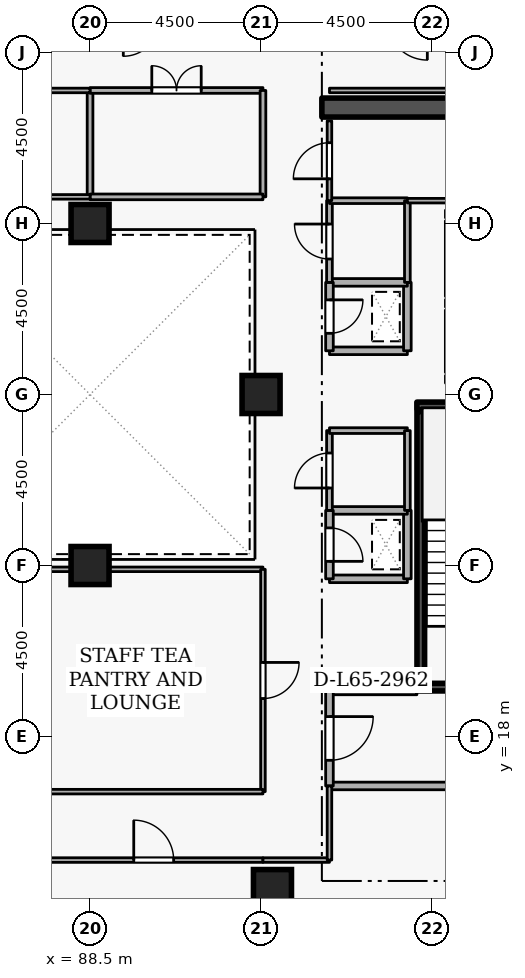
"""IFC4 building model, lengths in metres.
Left out: names, types, materials, properties, quantities, classifications, styles, units other than length and angle.
Written with IfcOpenShell. Run it as: python <this file> out.ifc"""

import sys

from ifc_helpers import new_model, si_unit, direction, frame, frame_2d, origin, origin_2d, place, context, subcontext, project, spatial, rectangle, extrude, element, fill, save


model = new_model("IFC4")
c1 = context("Model", 3, precision=1e-05, world=origin(), true_north=direction((0.0, 1.0)))
c2 = subcontext(c1, "Body", "Model", "MODEL_VIEW")
j1 = project(units=[si_unit("LENGTHUNIT", "METRE"), si_unit("PLANEANGLEUNIT", "RADIAN")], contexts=[c1])
p1 = place(None, origin())
s1 = spatial("IfcSite", under=j1, at=p1, CompositionType="ELEMENT")
p2 = place(p1, origin())
s2 = spatial("IfcBuilding", under=s1, at=p2, CompositionType="ELEMENT")
p3 = place(p2, frame((0.0, 0.0, 243.9)))
s3 = spatial("IfcBuildingStorey", under=s2, at=p3, CompositionType="ELEMENT", Elevation=243.9)
p4 = place(p3, frame((94.6, 34.55, 0.0), z_axis=(0.0, 0.0, 1.0), x_axis=(1.0, 0.0, 0.0)))
e1 = element("IfcWall", 1, at=p4, inside=s3, PredefinedType="SHEAR", context=c2, shape_type="SweptSolid", body=[
    extrude(rectangle(XDim=5.8, YDim=0.5, at=frame_2d((2.9, 0.0))), origin(), (0.0, 0.0, 1.0), 3.6),
])
for number, where, z_axis, x_axis in (
    (2, (93.3, 14.0, 0.0), (0.0, 0.0, 1.0), (1.0, 0.0, 0.0)),
    (3, (93.0, 27.0, 0.0), (0.0, 0.0, 1.0), (1.0, 0.0, 0.0)),
    (4, (88.5, 22.5, 0.0), (0.0, 0.0, 1.0), (1.0, 0.0, 0.0)),
    (5, (88.5, 31.5, 0.0), (0.0, 0.0, 1.0), (1.0, 0.0, 0.0)),
):
    element("IfcColumn", number, at=place(p3, frame(where, z_axis=z_axis, x_axis=x_axis)), inside=s3, PredefinedType="COLUMN", context=c2, shape_type="SweptSolid", body=[
        extrude(rectangle(XDim=1.0, YDim=1.0, at=origin_2d()), origin(), (0.0, 0.0, 1.0), 3.6),
    ])
p5 = place(p3, frame((97.95, 29.22, 0.0), z_axis=(0.0, 0.0, 1.0), x_axis=(0.0, -1.0, 0.0)))
e6 = element("IfcWall", 6, at=p5, inside=s3, PredefinedType="STANDARD", context=c2, shape_type="SweptSolid", body=[
    extrude(rectangle(XDim=1.64, YDim=0.2, at=frame_2d((0.82, 0.0))), origin(), (0.0, 0.0, 1.0), 3.34),
])
p6 = place(p5, frame((0.31, 0.0, 0.0)))
e7 = element("IfcOpeningElement", 7, at=p6, cuts=e6, PredefinedType="OPENING", context=c2, shape_type="SweptSolid", body=[
    extrude(rectangle(XDim=1.02, YDim=2.06, at=frame_2d((0.51, 1.03))), frame((0.0, 0.11, 0.0), z_axis=(0.0, -1.0, 0.0), x_axis=(1.0, 0.0, 0.0)), (0.0, 0.0, 1.0), 0.22),
])
p7 = place(p3, frame((97.95, 31.57, 0.0), z_axis=(0.0, 0.0, 1.0), x_axis=(0.0, -1.0, 0.0)))
e8 = element("IfcWall", 8, at=p7, inside=s3, PredefinedType="STANDARD", context=c2, shape_type="SweptSolid", body=[
    extrude(rectangle(XDim=1.99, YDim=0.2, at=frame_2d((0.995, 0.0))), origin(), (0.0, 0.0, 1.0), 3.34),
])
p8 = place(p7, frame((0.485, 0.0, 0.0)))
e9 = element("IfcOpeningElement", 9, at=p8, cuts=e8, PredefinedType="OPENING", context=c2, shape_type="SweptSolid", body=[
    extrude(rectangle(XDim=1.02, YDim=2.06, at=frame_2d((0.51, 1.03))), frame((0.0, 0.11, 0.0), z_axis=(0.0, -1.0, 0.0), x_axis=(1.0, 0.0, 0.0)), (0.0, 0.0, 1.0), 0.22),
])
p9 = place(p3, frame((100.45, 19.3, 0.0), z_axis=(0.0, 0.0, 1.0), x_axis=(-1.0, 0.0, 0.0)))
e10 = element("IfcWall", 10, at=p9, inside=s3, PredefinedType="SHEAR", context=c2, shape_type="SweptSolid", body=[
    extrude(rectangle(XDim=3.35, YDim=0.2, at=frame_2d((1.675, 0.0))), origin(), (0.0, 0.0, 1.0), 3.6),
])
p10 = place(p9, frame((1.125, 0.0, 0.0)))
e11 = element("IfcOpeningElement", 11, at=p10, cuts=e10, PredefinedType="OPENING", context=c2, shape_type="SweptSolid", body=[
    extrude(rectangle(XDim=1.1, YDim=2.1, at=frame_2d((0.55, 1.05))), frame((0.0, 0.11, 0.0), z_axis=(0.0, -1.0, 0.0), x_axis=(1.0, 0.0, 0.0)), (0.0, 0.0, 1.0), 0.22),
])
p11 = place(p3, frame((97.1, 26.7, 0.0), z_axis=(0.0, 0.0, 1.0), x_axis=(1.0, 0.0, 0.0)))
e12 = element("IfcWall", 12, at=p11, inside=s3, PredefinedType="SHEAR", context=c2, shape_type="SweptSolid", body=[
    extrude(rectangle(XDim=3.35, YDim=0.2, at=frame_2d((1.675, 0.0))), origin(), (0.0, 0.0, 1.0), 3.6),
])
p12 = place(p3, frame((97.203, 26.55, 0.0), z_axis=(0.0, 0.0, 1.0), x_axis=(0.0, -1.0, 0.0)))
e13 = element("IfcWall", 13, at=p12, inside=s3, PredefinedType="SHEAR", context=c2, shape_type="SweptSolid", body=[
    extrude(rectangle(XDim=7.1, YDim=0.2, at=frame_2d((3.55, 0.0))), origin(), (0.0, 0.0, 1.0), 3.6),
])
p13 = place(p3, frame((94.8, 16.7, 0.0), z_axis=(0.0, 0.0, 1.0), x_axis=(1.0, 0.0, 0.0)))
e14 = element("IfcWall", 14, at=p13, inside=s3, PredefinedType="STANDARD", context=c2, shape_type="SweptSolid", body=[
    extrude(rectangle(XDim=5.7, YDim=0.2, at=frame_2d((2.85, 0.0))), origin(), (0.0, 0.0, 1.0), 3.34),
])
p14 = place(p3, frame((97.1, 19.2, 0.0), z_axis=(0.0, 0.0, 1.0), x_axis=(-1.0, 0.0, 0.0)))
e15 = element("IfcWall", 15, at=p14, inside=s3, PredefinedType="STANDARD", context=c2, shape_type="SweptSolid", body=[
    extrude(rectangle(XDim=2.3, YDim=0.2, at=frame_2d((1.15, 0.0))), origin(), (0.0, 0.0, 1.0), 2.545),
])
p15 = place(p3, frame((94.8, 19.2, 0.0), z_axis=(0.0, 0.0, 1.0), x_axis=(0.0, -1.0, 0.0)))
e16 = element("IfcWall", 16, at=p15, inside=s3, PredefinedType="STANDARD", context=c2, shape_type="SweptSolid", body=[
    extrude(rectangle(XDim=2.5, YDim=0.2, at=frame_2d((1.25, 0.0))), origin(), (0.0, 0.0, 1.0), 3.34),
])
p16 = place(p15, frame((0.675, 0.0, 0.0)))
e17 = element("IfcOpeningElement", 17, at=p16, cuts=e16, PredefinedType="OPENING", context=c2, shape_type="SweptSolid", body=[
    extrude(rectangle(XDim=1.15, YDim=2.1, at=frame_2d((0.575, 1.05))), frame((0.0, 0.11, 0.0), z_axis=(0.0, -1.0, 0.0), x_axis=(1.0, 0.0, 0.0)), (0.0, 0.0, 1.0), 0.22),
])
p17 = place(p3, frame((94.8, 28.15, 0.0), z_axis=(0.0, 0.0, 1.0), x_axis=(1.0, 0.0, 0.0)))
e18 = element("IfcWall", 18, at=p17, inside=s3, PredefinedType="STANDARD", context=c2, shape_type="SweptSolid", body=[
    extrude(rectangle(XDim=2.05, YDim=0.2, at=frame_2d((1.025, 0.0))), origin(), (0.0, 0.0, 1.0), 3.34),
])
p18 = place(p3, frame((96.85, 28.15, 0.0), z_axis=(0.0, 0.0, 1.0), x_axis=(0.0, 1.0, 0.0)))
e19 = element("IfcWall", 19, at=p18, inside=s3, PredefinedType="STANDARD", context=c2, shape_type="SweptSolid", body=[
    extrude(rectangle(XDim=1.8, YDim=0.2, at=frame_2d((0.9, 0.0))), origin(), (0.0, 0.0, 1.0), 3.34),
])
p19 = place(p3, frame((96.85, 29.95, 0.0), z_axis=(0.0, 0.0, 1.0), x_axis=(-1.0, 0.0, 0.0)))
e20 = element("IfcWall", 20, at=p19, inside=s3, PredefinedType="STANDARD", context=c2, shape_type="SweptSolid", body=[
    extrude(rectangle(XDim=2.05, YDim=0.2, at=frame_2d((1.025, 0.0))), origin(), (0.0, 0.0, 1.0), 3.34),
])
p20 = place(p3, frame((94.8, 29.95, 0.0), z_axis=(0.0, 0.0, 1.0), x_axis=(0.0, -1.0, 0.0)))
e21 = element("IfcWall", 21, at=p20, inside=s3, PredefinedType="STANDARD", context=c2, shape_type="SweptSolid", body=[
    extrude(rectangle(XDim=1.8, YDim=0.2, at=frame_2d((0.9, 0.0))), origin(), (0.0, 0.0, 1.0), 3.34),
])
p21 = place(p20, frame((0.46, 0.0, 0.0)))
e22 = element("IfcOpeningElement", 22, at=p21, cuts=e21, PredefinedType="OPENING", context=c2, shape_type="SweptSolid", body=[
    extrude(rectangle(XDim=0.88, YDim=2.04, at=frame_2d((0.44, 1.02))), frame((0.0, 0.11, 0.0), z_axis=(0.0, -1.0, 0.0), x_axis=(1.0, 0.0, 0.0)), (0.0, 0.0, 1.0), 0.22),
])
p22 = place(p3, frame((94.8, 22.15, 0.0), z_axis=(0.0, 0.0, 1.0), x_axis=(1.0, 0.0, 0.0)))
e23 = element("IfcWall", 23, at=p22, inside=s3, PredefinedType="STANDARD", context=c2, shape_type="SweptSolid", body=[
    extrude(rectangle(XDim=2.05, YDim=0.2, at=frame_2d((1.025, 0.0))), origin(), (0.0, 0.0, 1.0), 3.34),
])
p23 = place(p3, frame((96.85, 22.15, 0.0), z_axis=(0.0, 0.0, 1.0), x_axis=(0.0, 1.0, 0.0)))
e24 = element("IfcWall", 24, at=p23, inside=s3, PredefinedType="STANDARD", context=c2, shape_type="SweptSolid", body=[
    extrude(rectangle(XDim=1.8, YDim=0.2, at=frame_2d((0.9, 0.0))), origin(), (0.0, 0.0, 1.0), 3.34),
])
p24 = place(p3, frame((96.85, 23.95, 0.0), z_axis=(0.0, 0.0, 1.0), x_axis=(-1.0, 0.0, 0.0)))
e25 = element("IfcWall", 25, at=p24, inside=s3, PredefinedType="STANDARD", context=c2, shape_type="SweptSolid", body=[
    extrude(rectangle(XDim=2.05, YDim=0.2, at=frame_2d((1.025, 0.0))), origin(), (0.0, 0.0, 1.0), 3.34),
])
p25 = place(p3, frame((94.8, 23.95, 0.0), z_axis=(0.0, 0.0, 1.0), x_axis=(0.0, -1.0, 0.0)))
e26 = element("IfcWall", 26, at=p25, inside=s3, PredefinedType="STANDARD", context=c2, shape_type="SweptSolid", body=[
    extrude(rectangle(XDim=1.8, YDim=0.2, at=frame_2d((0.9, 0.0))), origin(), (0.0, 0.0, 1.0), 3.34),
])
p26 = place(p25, frame((0.46, 0.0, 0.0)))
e27 = element("IfcOpeningElement", 27, at=p26, cuts=e26, PredefinedType="OPENING", context=c2, shape_type="SweptSolid", body=[
    extrude(rectangle(XDim=0.88, YDim=2.04, at=frame_2d((0.44, 1.02))), frame((0.0, 0.11, 0.0), z_axis=(0.0, -1.0, 0.0), x_axis=(1.0, 0.0, 0.0)), (0.0, 0.0, 1.0), 0.22),
])
p27 = place(p3, frame((94.8, 23.95, 0.0), z_axis=(0.0, 0.0, 1.0), x_axis=(0.0, 1.0, 0.0)))
e28 = element("IfcWall", 28, at=p27, inside=s3, PredefinedType="PARTITIONING", context=c2, shape_type="SweptSolid", body=[
    extrude(rectangle(XDim=2.1, YDim=0.15, at=frame_2d((1.05, 0.0))), origin(), (0.0, 0.0, 1.0), 3.34),
])
p28 = place(p27, frame((0.59, 0.0, 0.0)))
e29 = element("IfcOpeningElement", 29, at=p28, cuts=e28, PredefinedType="OPENING", context=c2, shape_type="SweptSolid", body=[
    extrude(rectangle(XDim=0.92, YDim=2.08, at=frame_2d((0.46, 1.04))), frame((0.0, 0.085, 0.0), z_axis=(0.0, -1.0, 0.0), x_axis=(1.0, 0.0, 0.0)), (0.0, 0.0, 1.0), 0.17),
])
p29 = place(p3, frame((94.8, 26.05, 0.0), z_axis=(0.0, 0.0, 1.0), x_axis=(1.0, 0.0, 0.0)))
e30 = element("IfcWall", 30, at=p29, inside=s3, PredefinedType="PARTITIONING", context=c2, shape_type="SweptSolid", body=[
    extrude(rectangle(XDim=2.05, YDim=0.15, at=frame_2d((1.025, 0.0))), origin(), (0.0, 0.0, 1.0), 3.34),
])
p30 = place(p3, frame((96.85, 26.05, 0.0), z_axis=(0.0, 0.0, 1.0), x_axis=(0.0, -1.0, 0.0)))
e31 = element("IfcWall", 31, at=p30, inside=s3, PredefinedType="PARTITIONING", context=c2, shape_type="SweptSolid", body=[
    extrude(rectangle(XDim=2.1, YDim=0.15, at=frame_2d((1.05, 0.0))), origin(), (0.0, 0.0, 1.0), 3.34),
])
p31 = place(p3, frame((94.8, 29.95, 0.0), z_axis=(0.0, 0.0, 1.0), x_axis=(0.0, 1.0, 0.0)))
e32 = element("IfcWall", 32, at=p31, inside=s3, PredefinedType="PARTITIONING", context=c2, shape_type="SweptSolid", body=[
    extrude(rectangle(XDim=2.15, YDim=0.15, at=frame_2d((1.075, 0.0))), origin(), (0.0, 0.0, 1.0), 3.34),
])
p32 = place(p31, frame((0.615, 0.0, 0.0)))
e33 = element("IfcOpeningElement", 33, at=p32, cuts=e32, PredefinedType="OPENING", context=c2, shape_type="SweptSolid", body=[
    extrude(rectangle(XDim=0.92, YDim=2.08, at=frame_2d((0.46, 1.04))), frame((0.0, 0.085, 0.0), z_axis=(0.0, -1.0, 0.0), x_axis=(1.0, 0.0, 0.0)), (0.0, 0.0, 1.0), 0.17),
])
p33 = place(p3, frame((94.8, 32.1, 0.0), z_axis=(0.0, 0.0, 1.0), x_axis=(1.0, 0.0, 0.0)))
e34 = element("IfcWall", 34, at=p33, inside=s3, PredefinedType="PARTITIONING", context=c2, shape_type="SweptSolid", body=[
    extrude(rectangle(XDim=2.05, YDim=0.15, at=frame_2d((1.025, 0.0))), origin(), (0.0, 0.0, 1.0), 3.34),
])
p34 = place(p3, frame((96.85, 32.1, 0.0), z_axis=(0.0, 0.0, 1.0), x_axis=(0.0, -1.0, 0.0)))
e35 = element("IfcWall", 35, at=p34, inside=s3, PredefinedType="PARTITIONING", context=c2, shape_type="SweptSolid", body=[
    extrude(rectangle(XDim=2.15, YDim=0.15, at=frame_2d((1.075, 0.0))), origin(), (0.0, 0.0, 1.0), 3.34),
])
p35 = place(p3, frame((94.8, 32.1, 0.0), z_axis=(0.0, 0.0, 1.0), x_axis=(0.0, 1.0, 0.0)))
e36 = element("IfcWall", 36, at=p35, inside=s3, PredefinedType="PARTITIONING", context=c2, shape_type="SweptSolid", body=[
    extrude(rectangle(XDim=2.1, YDim=0.12, at=frame_2d((1.05, 0.0))), origin(), (0.0, 0.0, 1.0), 3.34),
])
p36 = place(p35, frame((0.575, 0.0, 0.0)))
e37 = element("IfcOpeningElement", 37, at=p36, cuts=e36, PredefinedType="OPENING", context=c2, shape_type="SweptSolid", body=[
    extrude(rectangle(XDim=0.95, YDim=2.1, at=frame_2d((0.475, 1.05))), frame((0.0, 0.07, 0.0), z_axis=(0.0, -1.0, 0.0), x_axis=(1.0, 0.0, 0.0)), (0.0, 0.0, 1.0), 0.14),
])
p37 = place(p3, frame((100.4, 32.1, 0.0), z_axis=(0.0, 0.0, 1.0), x_axis=(-1.0, 0.0, 0.0)))
e38 = element("IfcWall", 38, at=p37, inside=s3, PredefinedType="PARTITIONING", context=c2, shape_type="SweptSolid", body=[
    extrude(rectangle(XDim=3.55, YDim=0.12, at=frame_2d((1.775, 0.0))), origin(), (0.0, 0.0, 1.0), 3.34),
])
p38 = place(p3, frame((94.8, 35.0, 0.0), z_axis=(0.0, 0.0, 1.0), x_axis=(1.0, 0.0, 0.0)))
e39 = element("IfcWall", 39, at=p38, inside=s3, PredefinedType="PARTITIONING", context=c2, shape_type="SweptSolid", body=[
    extrude(rectangle(XDim=5.9, YDim=0.12, at=frame_2d((2.95, 0.0))), origin(), (0.0, 0.0, 1.0), 3.34),
])
p39 = place(p3, frame((87.3, 14.75, 0.0), z_axis=(0.0, 0.0, 1.0), x_axis=(1.0, 0.0, 0.0)))
e40 = element("IfcWall", 40, at=p39, inside=s3, PredefinedType="PARTITIONING", context=c2, shape_type="SweptSolid", body=[
    extrude(rectangle(XDim=5.75, YDim=0.12, at=frame_2d((2.875, 0.0))), origin(), (0.0, 0.0, 1.0), 3.34),
])
p40 = place(p39, frame((2.35, 0.0, 0.0)))
e41 = element("IfcOpeningElement", 41, at=p40, cuts=e40, PredefinedType="OPENING", context=c2, shape_type="SweptSolid", body=[
    extrude(rectangle(XDim=1.05, YDim=2.1, at=frame_2d((0.525, 1.05))), frame((0.0, 0.07, 0.0), z_axis=(0.0, -1.0, 0.0), x_axis=(1.0, 0.0, 0.0)), (0.0, 0.0, 1.0), 0.14),
])
p41 = place(p3, frame((93.05, 14.75, 0.0), z_axis=(0.0, 0.0, 1.0), x_axis=(1.0, 0.0, 0.0)))
e42 = element("IfcWall", 42, at=p41, inside=s3, PredefinedType="PARTITIONING", context=c2, shape_type="SweptSolid", body=[
    extrude(rectangle(XDim=1.75, YDim=0.12, at=frame_2d((0.875, 0.0))), origin(), (0.0, 0.0, 1.0), 3.34),
])
p42 = place(p3, frame((94.8, 14.75, 0.0), z_axis=(0.0, 0.0, 1.0), x_axis=(0.0, 1.0, 0.0)))
e43 = element("IfcWall", 43, at=p42, inside=s3, PredefinedType="PARTITIONING", context=c2, shape_type="SweptSolid", body=[
    extrude(rectangle(XDim=1.95, YDim=0.12, at=frame_2d((0.975, 0.0))), origin(), (0.0, 0.0, 1.0), 3.34),
])
p43 = place(p3, frame((87.3, 22.4, 0.0), z_axis=(0.0, 0.0, 1.0), x_axis=(1.0, 0.0, 0.0)))
e44 = element("IfcWall", 44, at=p43, inside=s3, PredefinedType="PARTITIONING", context=c2, shape_type="SweptSolid", body=[
    extrude(rectangle(XDim=5.75, YDim=0.12, at=frame_2d((2.875, 0.0))), origin(), (0.0, 0.0, 1.0), 3.34),
])
p44 = place(p3, frame((93.05, 22.4, 0.0), z_axis=(0.0, 0.0, 1.0), x_axis=(0.0, -1.0, 0.0)))
e45 = element("IfcWall", 45, at=p44, inside=s3, PredefinedType="PARTITIONING", context=c2, shape_type="SweptSolid", body=[
    extrude(rectangle(XDim=5.85, YDim=0.12, at=frame_2d((2.925, 0.0))), origin(), (0.0, 0.0, 1.0), 3.34),
])
p45 = place(p44, frame((2.45, 0.0, 0.0)))
e46 = element("IfcOpeningElement", 46, at=p45, cuts=e45, PredefinedType="OPENING", context=c2, shape_type="SweptSolid", body=[
    extrude(rectangle(XDim=0.95, YDim=2.1, at=frame_2d((0.475, 1.05))), frame((0.0, 0.07, 0.0), z_axis=(0.0, -1.0, 0.0), x_axis=(1.0, 0.0, 0.0)), (0.0, 0.0, 1.0), 0.14),
])
p46 = place(p3, frame((93.05, 16.55, 0.0), z_axis=(0.0, 0.0, 1.0), x_axis=(-1.0, 0.0, 0.0)))
e47 = element("IfcWall", 47, at=p46, inside=s3, PredefinedType="PARTITIONING", context=c2, shape_type="SweptSolid", body=[
    extrude(rectangle(XDim=5.75, YDim=0.12, at=frame_2d((2.875, 0.0))), origin(), (0.0, 0.0, 1.0), 3.34),
])
p47 = place(p3, frame((88.5, 32.2, 0.0), z_axis=(0.0, 0.0, 1.0), x_axis=(0.0, 1.0, 0.0)))
e48 = element("IfcWall", 48, at=p47, inside=s3, PredefinedType="PARTITIONING", context=c2, shape_type="SweptSolid", body=[
    extrude(rectangle(XDim=2.8, YDim=0.15, at=frame_2d((1.4, 0.0))), origin(), (0.0, 0.0, 1.0), 2.878),
])
p48 = place(p3, frame((88.5, 35.0, 0.0), z_axis=(0.0, 0.0, 1.0), x_axis=(1.0, 0.0, 0.0)))
e49 = element("IfcWall", 49, at=p48, inside=s3, PredefinedType="PARTITIONING", context=c2, shape_type="SweptSolid", body=[
    extrude(rectangle(XDim=4.55, YDim=0.15, at=frame_2d((2.275, 0.0))), origin(), (0.0, 0.0, 1.0), 3.34),
])
p49 = place(p48, frame((1.625, 0.0, 0.0)))
e50 = element("IfcOpeningElement", 50, at=p49, cuts=e49, PredefinedType="OPENING", context=c2, shape_type="SweptSolid", body=[
    extrude(rectangle(XDim=1.3, YDim=2.12, at=frame_2d((0.65, 1.06))), frame((0.0, 0.085, 0.0), z_axis=(0.0, -1.0, 0.0), x_axis=(1.0, 0.0, 0.0)), (0.0, 0.0, 1.0), 0.17),
])
p50 = place(p3, frame((93.05, 35.0, 0.0), z_axis=(0.0, 0.0, 1.0), x_axis=(0.0, -1.0, 0.0)))
e51 = element("IfcWall", 51, at=p50, inside=s3, PredefinedType="PARTITIONING", context=c2, shape_type="SweptSolid", body=[
    extrude(rectangle(XDim=2.8, YDim=0.15, at=frame_2d((1.4, 0.0))), origin(), (0.0, 0.0, 1.0), 3.34),
])
p51 = place(p3, frame((93.05, 32.2, 0.0), z_axis=(0.0, 0.0, 1.0), x_axis=(-1.0, 0.0, 0.0)))
e52 = element("IfcWall", 52, at=p51, inside=s3, PredefinedType="PARTITIONING", context=c2, shape_type="SweptSolid", body=[
    extrude(rectangle(XDim=4.55, YDim=0.15, at=frame_2d((2.275, 0.0))), origin(), (0.0, 0.0, 1.0), 3.34),
])
p52 = place(p3, frame((83.95, 35.0, 0.0), z_axis=(0.0, 0.0, 1.0), x_axis=(1.0, 0.0, 0.0)))
e53 = element("IfcWall", 53, at=p52, inside=s3, PredefinedType="PARTITIONING", context=c2, shape_type="SweptSolid", body=[
    extrude(rectangle(XDim=4.55, YDim=0.12, at=frame_2d((2.275, 0.0))), origin(), (0.0, 0.0, 1.0), 3.34),
])
p53 = place(p52, frame((1.8, 0.0, 0.0)))
e54 = element("IfcOpeningElement", 54, at=p53, cuts=e53, PredefinedType="OPENING", context=c2, shape_type="SweptSolid", body=[
    extrude(rectangle(XDim=0.95, YDim=2.1, at=frame_2d((0.475, 1.05))), frame((0.0, 0.07, 0.0), z_axis=(0.0, -1.0, 0.0), x_axis=(1.0, 0.0, 0.0)), (0.0, 0.0, 1.0), 0.14),
])
p54 = place(p3, frame((88.5, 32.2, 0.0), z_axis=(0.0, 0.0, 1.0), x_axis=(-1.0, 0.0, 0.0)))
e55 = element("IfcWall", 55, at=p54, inside=s3, PredefinedType="PARTITIONING", context=c2, shape_type="SweptSolid", body=[
    extrude(rectangle(XDim=4.55, YDim=0.12, at=frame_2d((2.275, 0.0))), origin(), (0.0, 0.0, 1.0), 3.34),
])
p55 = place(p16, origin())
e56 = element("IfcDoor", 56, at=p55, inside=s3, OperationType="SINGLE_SWING_LEFT", PredefinedType="DOOR", context=c2, shape_type="SweptSolid", body=[
    extrude(rectangle(XDim=1.15, YDim=2.1, at=frame_2d((0.575, 1.05))), frame((0.0, 0.025, 0.0), z_axis=(0.0, -1.0, 0.0), x_axis=(1.0, 0.0, 0.0)), (0.0, 0.0, 1.0), 0.05),
])
fill(e17, e56)
p56 = place(p21, origin())
e57 = element("IfcDoor", 57, at=p56, inside=s3, OperationType="SINGLE_SWING_LEFT", PredefinedType="DOOR", context=c2, shape_type="SweptSolid", body=[
    extrude(rectangle(XDim=0.88, YDim=2.04, at=frame_2d((0.44, 1.02))), frame((0.0, 0.025, 0.0), z_axis=(0.0, -1.0, 0.0), x_axis=(1.0, 0.0, 0.0)), (0.0, 0.0, 1.0), 0.05),
])
fill(e22, e57)
p57 = place(p26, origin())
e58 = element("IfcDoor", 58, at=p57, inside=s3, OperationType="SINGLE_SWING_RIGHT", PredefinedType="DOOR", context=c2, shape_type="SweptSolid", body=[
    extrude(rectangle(XDim=0.88, YDim=2.04, at=frame_2d((0.44, 1.02))), frame((0.0, 0.025, 0.0), z_axis=(0.0, -1.0, 0.0), x_axis=(1.0, 0.0, 0.0)), (0.0, 0.0, 1.0), 0.05),
])
fill(e27, e58)
p58 = place(p28, origin())
e59 = element("IfcDoor", 59, at=p58, inside=s3, OperationType="SINGLE_SWING_LEFT", PredefinedType="DOOR", context=c2, shape_type="SweptSolid", body=[
    extrude(rectangle(XDim=0.92, YDim=2.08, at=frame_2d((0.46, 1.04))), frame((0.0, 0.025, 0.0), z_axis=(0.0, -1.0, 0.0), x_axis=(1.0, 0.0, 0.0)), (0.0, 0.0, 1.0), 0.05),
])
fill(e29, e59)
p59 = place(p32, origin())
e60 = element("IfcDoor", 60, at=p59, inside=s3, OperationType="SINGLE_SWING_RIGHT", PredefinedType="DOOR", context=c2, shape_type="SweptSolid", body=[
    extrude(rectangle(XDim=0.92, YDim=2.08, at=frame_2d((0.46, 1.04))), frame((0.0, 0.025, 0.0), z_axis=(0.0, -1.0, 0.0), x_axis=(1.0, 0.0, 0.0)), (0.0, 0.0, 1.0), 0.05),
])
fill(e33, e60)
p60 = place(p36, origin())
e61 = element("IfcDoor", 61, at=p60, inside=s3, OperationType="SINGLE_SWING_LEFT", PredefinedType="DOOR", context=c2, shape_type="SweptSolid", body=[
    extrude(rectangle(XDim=0.95, YDim=2.1, at=frame_2d((0.475, 1.05))), frame((0.0, 0.025, 0.0), z_axis=(0.0, -1.0, 0.0), x_axis=(1.0, 0.0, 0.0)), (0.0, 0.0, 1.0), 0.05),
])
fill(e37, e61)
p61 = place(p40, origin())
e62 = element("IfcDoor", 62, at=p61, inside=s3, OperationType="SINGLE_SWING_LEFT", PredefinedType="DOOR", context=c2, shape_type="SweptSolid", body=[
    extrude(rectangle(XDim=1.05, YDim=2.1, at=frame_2d((0.525, 1.05))), frame((0.0, 0.025, 0.0), z_axis=(0.0, -1.0, 0.0), x_axis=(1.0, 0.0, 0.0)), (0.0, 0.0, 1.0), 0.05),
])
fill(e41, e62)
p62 = place(p45, origin())
e63 = element("IfcDoor", 63, at=p62, inside=s3, OperationType="SINGLE_SWING_LEFT", PredefinedType="DOOR", context=c2, shape_type="SweptSolid", body=[
    extrude(rectangle(XDim=0.95, YDim=2.1, at=frame_2d((0.475, 1.05))), frame((0.0, 0.025, 0.0), z_axis=(0.0, -1.0, 0.0), x_axis=(1.0, 0.0, 0.0)), (0.0, 0.0, 1.0), 0.05),
])
fill(e46, e63)
p63 = place(p49, origin())
e64 = element("IfcDoor", 64, at=p63, inside=s3, OperationType="DOUBLE_DOOR_SINGLE_SWING", PredefinedType="DOOR", context=c2, shape_type="SweptSolid", body=[
    extrude(rectangle(XDim=1.3, YDim=2.12, at=frame_2d((0.65, 1.06))), frame((0.0, 0.025, 0.0), z_axis=(0.0, -1.0, 0.0), x_axis=(1.0, 0.0, 0.0)), (0.0, 0.0, 1.0), 0.05),
])
fill(e50, e64)
save(model, sys.argv[1])
